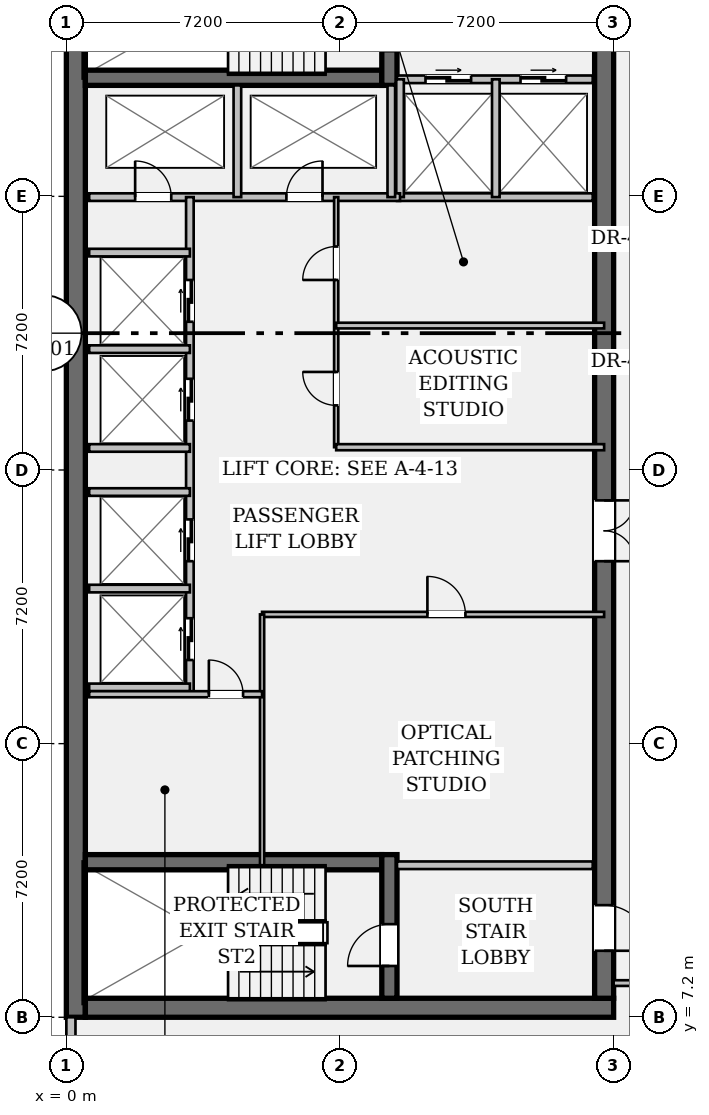
"""IFC4 building model, lengths in metres.
Left out: names, types, materials, properties, quantities, classifications, styles, units other than length and angle.
Written with IfcOpenShell. Run it as: python <this file> out.ifc"""

import sys

from ifc_helpers import new_model, si_unit, direction, frame, frame_2d, origin, place, context, subcontext, project, spatial, rectangle, extrude, element, fill, save


model = new_model("IFC4")
c1 = context("Model", 3, precision=1e-05, world=origin(), true_north=direction((0.0, 1.0)))
c2 = subcontext(c1, "Body", "Model", "MODEL_VIEW")
j1 = project(units=[si_unit("LENGTHUNIT", "METRE"), si_unit("PLANEANGLEUNIT", "RADIAN")], contexts=[c1])
p1 = place(None, origin())
s1 = spatial("IfcSite", under=j1, at=p1, CompositionType="ELEMENT")
p2 = place(p1, origin())
s2 = spatial("IfcBuilding", under=s1, at=p2, CompositionType="ELEMENT")
p3 = place(p2, frame((0.0, 0.0, 241.15)))
s3 = spatial("IfcBuildingStorey", under=s2, at=p3, CompositionType="ELEMENT", Elevation=241.15)
p4 = place(p3, frame((0.25, 7.2, 0.0), z_axis=(0.0, 0.0, 1.0), x_axis=(0.0, 1.0, 0.0)))
e1 = element("IfcWall", 1, at=p4, inside=s3, PredefinedType="SHEAR", context=c2, shape_type="SweptSolid", body=[
    extrude(rectangle(XDim=28.8, YDim=0.5, at=frame_2d((14.4, 0.0))), origin(), (0.0, 0.0, 1.0), 3.24),
])
p5 = place(p3, frame((0.5, 7.45, 0.0), z_axis=(0.0, 0.0, 1.0), x_axis=(1.0, 0.0, 0.0)))
e2 = element("IfcWall", 2, at=p5, inside=s3, PredefinedType="SHEAR", context=c2, shape_type="SweptSolid", body=[
    extrude(rectangle(XDim=13.9, YDim=0.5, at=frame_2d((6.95, 0.0))), origin(), (0.0, 0.0, 1.0), 3.24),
])
p6 = place(p3, frame((14.15, 35.5, 0.0), z_axis=(0.0, 0.0, 1.0), x_axis=(0.0, -1.0, 0.0)))
e3 = element("IfcWall", 3, at=p6, inside=s3, PredefinedType="SHEAR", context=c2, shape_type="SweptSolid", body=[
    extrude(rectangle(XDim=27.8, YDim=0.5, at=frame_2d((13.9, 0.0))), origin(), (0.0, 0.0, 1.0), 3.24),
])
p7 = place(p6, frame((1.4, 0.0, 0.0)))
e4 = element("IfcOpeningElement", 4, at=p7, cuts=e3, PredefinedType="OPENING", context=c2, shape_type="SweptSolid", body=[
    extrude(rectangle(XDim=1.2, YDim=2.15, at=frame_2d((0.6, 1.075))), frame((0.0, 0.262, 0.0), z_axis=(0.0, -1.0, 0.0), x_axis=(1.0, 0.0, 0.0)), (0.0, 0.0, 1.0), 0.524),
])
p8 = place(p6, frame((25.35, 0.0, 0.0)))
e5 = element("IfcOpeningElement", 5, at=p8, cuts=e3, PredefinedType="OPENING", context=c2, shape_type="SweptSolid", body=[
    extrude(rectangle(XDim=1.2, YDim=2.15, at=frame_2d((0.6, 1.075))), frame((0.0, 0.262, 0.0), z_axis=(0.0, -1.0, 0.0), x_axis=(1.0, 0.0, 0.0)), (0.0, 0.0, 1.0), 0.524),
])
p9 = place(p6, frame((14.7, 0.0, 0.0)))
e6 = element("IfcOpeningElement", 6, at=p9, cuts=e3, PredefinedType="OPENING", context=c2, shape_type="SweptSolid", body=[
    extrude(rectangle(XDim=1.6, YDim=2.2, at=frame_2d((0.8, 1.1))), frame((0.0, 0.262, 0.0), z_axis=(0.0, -1.0, 0.0), x_axis=(1.0, 0.0, 0.0)), (0.0, 0.0, 1.0), 0.524),
])
for number, where, z_axis, x_axis in (
    (7, (0.5, 31.92, 0.0), (0.0, 0.0, 1.0), (1.0, 0.0, 0.0)),
    (8, (0.5, 11.28, 0.0), (0.0, 0.0, 1.0), (1.0, 0.0, 0.0)),
):
    element("IfcWall", number, at=place(p3, frame(where, z_axis=z_axis, x_axis=x_axis)), inside=s3, PredefinedType="SHEAR", context=c2, shape_type="SweptSolid", body=[
        extrude(rectangle(XDim=7.8, YDim=0.4, at=frame_2d((3.9, 0.0))), origin(), (0.0, 0.0, 1.0), 3.24),
    ])
p10 = place(p3, frame((8.5, 31.72, 0.0), z_axis=(0.0, 0.0, 1.0), x_axis=(0.0, 1.0, 0.0)))
e9 = element("IfcWall", 9, at=p10, inside=s3, PredefinedType="SHEAR", context=c2, shape_type="SweptSolid", body=[
    extrude(rectangle(XDim=3.78, YDim=0.4, at=frame_2d((1.89, 0.0))), origin(), (0.0, 0.0, 1.0), 3.24),
])
p11 = place(p10, frame((0.9, 0.0, 0.0)))
e10 = element("IfcOpeningElement", 10, at=p11, cuts=e9, PredefinedType="OPENING", context=c2, shape_type="SweptSolid", body=[
    extrude(rectangle(XDim=1.1, YDim=2.15, at=frame_2d((0.55, 1.075))), frame((0.0, 0.212, 0.0), z_axis=(0.0, -1.0, 0.0), x_axis=(1.0, 0.0, 0.0)), (0.0, 0.0, 1.0), 0.424),
])
p12 = place(p3, frame((8.5, 7.7, 0.0), z_axis=(0.0, 0.0, 1.0), x_axis=(0.0, 1.0, 0.0)))
e11 = element("IfcWall", 11, at=p12, inside=s3, PredefinedType="SHEAR", context=c2, shape_type="SweptSolid", body=[
    extrude(rectangle(XDim=3.78, YDim=0.4, at=frame_2d((1.89, 0.0))), origin(), (0.0, 0.0, 1.0), 3.24),
])
p13 = place(p12, frame((0.85, 0.0, 0.0)))
e12 = element("IfcOpeningElement", 12, at=p13, cuts=e11, PredefinedType="OPENING", context=c2, shape_type="SweptSolid", body=[
    extrude(rectangle(XDim=1.1, YDim=2.15, at=frame_2d((0.55, 1.075))), frame((0.0, 0.212, 0.0), z_axis=(0.0, -1.0, 0.0), x_axis=(1.0, 0.0, 0.0)), (0.0, 0.0, 1.0), 0.424),
])
p14 = place(p3, frame((0.12, 6.52, 0.0), z_axis=(0.0, 0.0, 1.0), x_axis=(0.0, 1.0, 0.0)))
e13 = element("IfcWall", 13, at=p14, inside=s3, PredefinedType="STANDARD", context=c2, shape_type="SweptSolid", body=[
    extrude(rectangle(XDim=0.68, YDim=0.24, at=frame_2d((0.34, 0.0))), origin(), (0.0, 0.0, 1.0), 3.24),
])
p15 = place(p3, frame((8.7, 31.88, 0.0), z_axis=(0.0, 0.0, 1.0), x_axis=(1.0, 0.0, 0.0)))
e14 = element("IfcWall", 14, at=p15, inside=s3, PredefinedType="PARTITIONING", context=c2, shape_type="SweptSolid", body=[
    extrude(rectangle(XDim=5.15, YDim=0.2, at=frame_2d((2.575, 0.0))), origin(), (0.0, 0.0, 1.0), 3.24),
])
p16 = place(p15, frame((0.75, 0.0, 0.0)))
e15 = element("IfcOpeningElement", 15, at=p16, cuts=e14, PredefinedType="OPENING", context=c2, shape_type="SweptSolid", body=[
    extrude(rectangle(XDim=1.2, YDim=2.2, at=frame_2d((0.6, 1.1))), frame((0.0, 0.112, 0.0), z_axis=(0.0, -1.0, 0.0), x_axis=(1.0, 0.0, 0.0)), (0.0, 0.0, 1.0), 0.224),
])
p17 = place(p15, frame((3.25, 0.0, 0.0)))
e16 = element("IfcOpeningElement", 16, at=p17, cuts=e14, PredefinedType="OPENING", context=c2, shape_type="SweptSolid", body=[
    extrude(rectangle(XDim=1.2, YDim=2.2, at=frame_2d((0.6, 1.1))), frame((0.0, 0.112, 0.0), z_axis=(0.0, -1.0, 0.0), x_axis=(1.0, 0.0, 0.0)), (0.0, 0.0, 1.0), 0.224),
])
for number, where, z_axis, x_axis in (
    (17, (8.7, 11.2, 0.0), (0.0, 0.0, 1.0), (1.0, 0.0, 0.0)),
    (18, (8.7, 28.78, 0.0), (0.0, 0.0, 1.0), (1.0, 0.0, 0.0)),
):
    element("IfcWall", number, at=place(p3, frame(where, z_axis=z_axis, x_axis=x_axis)), inside=s3, PredefinedType="PARTITIONING", context=c2, shape_type="SweptSolid", body=[
        extrude(rectangle(XDim=5.15, YDim=0.2, at=frame_2d((2.575, 0.0))), origin(), (0.0, 0.0, 1.0), 3.24),
    ])
for number, where, z_axis, x_axis in (
    (19, (8.78, 28.78, 0.0), (0.0, 0.0, 1.0), (0.0, 1.0, 0.0)),
    (20, (11.3, 28.78, 0.0), (0.0, 0.0, 1.0), (0.0, 1.0, 0.0)),
):
    element("IfcWall", number, at=place(p3, frame(where, z_axis=z_axis, x_axis=x_axis)), inside=s3, PredefinedType="PARTITIONING", context=c2, shape_type="SweptSolid", body=[
        extrude(rectangle(XDim=3.1, YDim=0.2, at=frame_2d((1.55, 0.0))), origin(), (0.0, 0.0, 1.0), 3.24),
    ])
p18 = place(p3, frame((0.6, 28.78, 0.0), z_axis=(0.0, 0.0, 1.0), x_axis=(1.0, 0.0, 0.0)))
e21 = element("IfcWall", 21, at=p18, inside=s3, PredefinedType="PARTITIONING", context=c2, shape_type="SweptSolid", body=[
    extrude(rectangle(XDim=8.18, YDim=0.2, at=frame_2d((4.09, 0.0))), origin(), (0.0, 0.0, 1.0), 3.24),
])
p19 = place(p18, frame((1.21, 0.0, 0.0)))
e22 = element("IfcOpeningElement", 22, at=p19, cuts=e21, PredefinedType="OPENING", context=c2, shape_type="SweptSolid", body=[
    extrude(rectangle(XDim=0.95, YDim=2.15, at=frame_2d((0.475, 1.075))), frame((0.0, 0.112, 0.0), z_axis=(0.0, -1.0, 0.0), x_axis=(1.0, 0.0, 0.0)), (0.0, 0.0, 1.0), 0.224),
])
p20 = place(p18, frame((5.19, 0.0, 0.0)))
e23 = element("IfcOpeningElement", 23, at=p20, cuts=e21, PredefinedType="OPENING", context=c2, shape_type="SweptSolid", body=[
    extrude(rectangle(XDim=0.95, YDim=2.15, at=frame_2d((0.475, 1.075))), frame((0.0, 0.112, 0.0), z_axis=(0.0, -1.0, 0.0), x_axis=(1.0, 0.0, 0.0)), (0.0, 0.0, 1.0), 0.224),
])
for number, where, z_axis, x_axis in (
    (24, (4.5, 28.78, 0.0), (0.0, 0.0, 1.0), (0.0, 1.0, 0.0)),
    (25, (8.55, 28.78, 0.0), (0.0, 0.0, 1.0), (0.0, 1.0, 0.0)),
):
    element("IfcWall", number, at=place(p3, frame(where, z_axis=z_axis, x_axis=x_axis)), inside=s3, PredefinedType="PARTITIONING", context=c2, shape_type="SweptSolid", body=[
        extrude(rectangle(XDim=2.94, YDim=0.2, at=frame_2d((1.47, 0.0))), origin(), (0.0, 0.0, 1.0), 3.24),
    ])
p21 = place(p3, frame((3.25, 15.7, 0.0), z_axis=(0.0, 0.0, 1.0), x_axis=(0.0, 1.0, 0.0)))
e26 = element("IfcWall", 26, at=p21, inside=s3, PredefinedType="PARTITIONING", context=c2, shape_type="SweptSolid", body=[
    extrude(rectangle(XDim=13.08, YDim=0.2, at=frame_2d((6.54, 0.0))), origin(), (0.0, 0.0, 1.0), 3.24),
])
p22 = place(p21, frame((0.9, 0.0, 0.0)))
e27 = element("IfcOpeningElement", 27, at=p22, cuts=e26, PredefinedType="OPENING", context=c2, shape_type="SweptSolid", body=[
    extrude(rectangle(XDim=1.1, YDim=2.2, at=frame_2d((0.55, 1.1))), frame((0.0, 0.112, 0.0), z_axis=(0.0, -1.0, 0.0), x_axis=(1.0, 0.0, 0.0)), (0.0, 0.0, 1.0), 0.224),
])
p23 = place(p21, frame((3.5, 0.0, 0.0)))
e28 = element("IfcOpeningElement", 28, at=p23, cuts=e26, PredefinedType="OPENING", context=c2, shape_type="SweptSolid", body=[
    extrude(rectangle(XDim=1.1, YDim=2.2, at=frame_2d((0.55, 1.1))), frame((0.0, 0.112, 0.0), z_axis=(0.0, -1.0, 0.0), x_axis=(1.0, 0.0, 0.0)), (0.0, 0.0, 1.0), 0.224),
])
p24 = place(p21, frame((7.2, 0.0, 0.0)))
e29 = element("IfcOpeningElement", 29, at=p24, cuts=e26, PredefinedType="OPENING", context=c2, shape_type="SweptSolid", body=[
    extrude(rectangle(XDim=1.1, YDim=2.2, at=frame_2d((0.55, 1.1))), frame((0.0, 0.112, 0.0), z_axis=(0.0, -1.0, 0.0), x_axis=(1.0, 0.0, 0.0)), (0.0, 0.0, 1.0), 0.224),
])
p25 = place(p21, frame((9.8, 0.0, 0.0)))
e30 = element("IfcOpeningElement", 30, at=p25, cuts=e26, PredefinedType="OPENING", context=c2, shape_type="SweptSolid", body=[
    extrude(rectangle(XDim=1.1, YDim=2.2, at=frame_2d((0.55, 1.1))), frame((0.0, 0.112, 0.0), z_axis=(0.0, -1.0, 0.0), x_axis=(1.0, 0.0, 0.0)), (0.0, 0.0, 1.0), 0.224),
])
for number, where, z_axis, x_axis in (
    (31, (0.6, 15.88, 0.0), (0.0, 0.0, 1.0), (1.0, 0.0, 0.0)),
    (32, (0.6, 18.48, 0.0), (0.0, 0.0, 1.0), (1.0, 0.0, 0.0)),
    (33, (0.6, 22.18, 0.0), (0.0, 0.0, 1.0), (1.0, 0.0, 0.0)),
    (34, (0.6, 24.78, 0.0), (0.0, 0.0, 1.0), (1.0, 0.0, 0.0)),
    (35, (0.6, 21.02, 0.0), (0.0, 0.0, 1.0), (1.0, 0.0, 0.0)),
    (36, (0.6, 27.32, 0.0), (0.0, 0.0, 1.0), (1.0, 0.0, 0.0)),
):
    element("IfcWall", number, at=place(p3, frame(where, z_axis=z_axis, x_axis=x_axis)), inside=s3, PredefinedType="PARTITIONING", context=c2, shape_type="SweptSolid", body=[
        extrude(rectangle(XDim=2.65, YDim=0.2, at=frame_2d((1.325, 0.0))), origin(), (0.0, 0.0, 1.0), 3.24),
    ])
p26 = place(p3, frame((7.1, 22.2, 0.0), z_axis=(0.0, 0.0, 1.0), x_axis=(0.0, 1.0, 0.0)))
e37 = element("IfcWall", 37, at=p26, inside=s3, PredefinedType="PARTITIONING", context=c2, shape_type="SweptSolid", body=[
    extrude(rectangle(XDim=6.58, YDim=0.11, at=frame_2d((3.29, 0.0))), origin(), (0.0, 0.0, 1.0), 3.24),
])
p27 = place(p26, frame((1.1, 0.0, 0.0)))
e38 = element("IfcOpeningElement", 38, at=p27, cuts=e37, PredefinedType="OPENING", context=c2, shape_type="SweptSolid", body=[
    extrude(rectangle(XDim=0.88, YDim=2.15, at=frame_2d((0.44, 1.075))), frame((0.0, 0.067, 0.0), z_axis=(0.0, -1.0, 0.0), x_axis=(1.0, 0.0, 0.0)), (0.0, 0.0, 1.0), 0.134),
])
p28 = place(p26, frame((4.4, 0.0, 0.0)))
e39 = element("IfcOpeningElement", 39, at=p28, cuts=e37, PredefinedType="OPENING", context=c2, shape_type="SweptSolid", body=[
    extrude(rectangle(XDim=0.88, YDim=2.15, at=frame_2d((0.44, 1.075))), frame((0.0, 0.067, 0.0), z_axis=(0.0, -1.0, 0.0), x_axis=(1.0, 0.0, 0.0)), (0.0, 0.0, 1.0), 0.134),
])
p29 = place(p3, frame((7.1, 22.2, 0.0), z_axis=(0.0, 0.0, 1.0), x_axis=(1.0, 0.0, 0.0)))
e40 = element("IfcWall", 40, at=p29, inside=s3, PredefinedType="PARTITIONING", context=c2, shape_type="SweptSolid", body=[
    extrude(rectangle(XDim=7.05, YDim=0.16, at=frame_2d((3.525, 0.0))), origin(), (0.0, 0.0, 1.0), 3.24),
])
p30 = place(p3, frame((7.1, 25.4, 0.0), z_axis=(0.0, 0.0, 1.0), x_axis=(1.0, 0.0, 0.0)))
e41 = element("IfcWall", 41, at=p30, inside=s3, PredefinedType="PARTITIONING", context=c2, shape_type="SweptSolid", body=[
    extrude(rectangle(XDim=7.05, YDim=0.15, at=frame_2d((3.525, 0.0))), origin(), (0.0, 0.0, 1.0), 3.24),
])
p31 = place(p3, frame((5.15, 17.8, 0.0), z_axis=(0.0, 0.0, 1.0), x_axis=(1.0, 0.0, 0.0)))
e42 = element("IfcWall", 42, at=p31, inside=s3, PredefinedType="PARTITIONING", context=c2, shape_type="SweptSolid", body=[
    extrude(rectangle(XDim=9.0, YDim=0.135, at=frame_2d((4.5, 0.0))), origin(), (0.0, 0.0, 1.0), 3.24),
])
p32 = place(p31, frame((4.35, 0.0, 0.0)))
e43 = element("IfcOpeningElement", 43, at=p32, cuts=e42, PredefinedType="OPENING", context=c2, shape_type="SweptSolid", body=[
    extrude(rectangle(XDim=1.0, YDim=2.15, at=frame_2d((0.5, 1.075))), frame((0.0, 0.08, 0.0), z_axis=(0.0, -1.0, 0.0), x_axis=(1.0, 0.0, 0.0)), (0.0, 0.0, 1.0), 0.159),
])
p33 = place(p3, frame((5.15, 11.2, 0.0), z_axis=(0.0, 0.0, 1.0), x_axis=(0.0, 1.0, 0.0)))
e44 = element("IfcWall", 44, at=p33, inside=s3, PredefinedType="PARTITIONING", context=c2, shape_type="SweptSolid", body=[
    extrude(rectangle(XDim=6.6, YDim=0.11, at=frame_2d((3.3, 0.0))), origin(), (0.0, 0.0, 1.0), 3.24),
])
p34 = place(p3, frame((0.6, 15.7, 0.0), z_axis=(0.0, 0.0, 1.0), x_axis=(1.0, 0.0, 0.0)))
e45 = element("IfcWall", 45, at=p34, inside=s3, PredefinedType="PARTITIONING", context=c2, shape_type="SweptSolid", body=[
    extrude(rectangle(XDim=4.55, YDim=0.16, at=frame_2d((2.275, 0.0))), origin(), (0.0, 0.0, 1.0), 3.24),
])
p35 = place(p34, frame((3.15, 0.0, 0.0)))
e46 = element("IfcOpeningElement", 46, at=p35, cuts=e45, PredefinedType="OPENING", context=c2, shape_type="SweptSolid", body=[
    extrude(rectangle(XDim=0.9, YDim=2.15, at=frame_2d((0.45, 1.075))), frame((0.0, 0.092, 0.0), z_axis=(0.0, -1.0, 0.0), x_axis=(1.0, 0.0, 0.0)), (0.0, 0.0, 1.0), 0.184),
])
p36 = place(p3, frame((14.4, 8.1, 0.0), z_axis=(0.0, 0.0, 1.0), x_axis=(1.0, 0.0, 0.0)))
e47 = element("IfcWall", 47, at=p36, inside=s3, PredefinedType="PARTITIONING", context=c2, shape_type="SweptSolid", body=[
    extrude(rectangle(XDim=2.95, YDim=0.15, at=frame_2d((1.475, 0.0))), origin(), (0.0, 0.0, 1.0), 3.24),
])
p37 = place(p36, frame((0.95, 0.0, 0.0)))
e48 = element("IfcOpeningElement", 48, at=p37, cuts=e47, PredefinedType="OPENING", context=c2, shape_type="SweptSolid", body=[
    extrude(rectangle(XDim=0.88, YDim=2.15, at=frame_2d((0.44, 1.075))), frame((0.0, 0.087, 0.0), z_axis=(0.0, -1.0, 0.0), x_axis=(1.0, 0.0, 0.0)), (0.0, 0.0, 1.0), 0.174),
])
p38 = place(p13, origin())
e49 = element("IfcDoor", 49, at=p38, inside=s3, OperationType="SINGLE_SWING_LEFT", PredefinedType="DOOR", context=c2, shape_type="SweptSolid", body=[
    extrude(rectangle(XDim=1.1, YDim=2.15, at=frame_2d((0.55, 1.075))), frame((0.0, 0.025, 0.0), z_axis=(0.0, -1.0, 0.0), x_axis=(1.0, 0.0, 0.0)), (0.0, 0.0, 1.0), 0.05),
])
fill(e12, e49)
p39 = place(p8, origin())
e50 = element("IfcDoor", 50, at=p39, inside=s3, OperationType="SINGLE_SWING_RIGHT", PredefinedType="DOOR", context=c2, shape_type="SweptSolid", body=[
    extrude(rectangle(XDim=1.2, YDim=2.15, at=frame_2d((0.6, 1.075))), frame((0.0, 0.025, 0.0), z_axis=(0.0, -1.0, 0.0), x_axis=(1.0, 0.0, 0.0)), (0.0, 0.0, 1.0), 0.05),
])
fill(e5, e50)
p40 = place(p16, origin())
e51 = element("IfcDoor", 51, at=p40, inside=s3, OperationType="DOUBLE_DOOR_SLIDING", PredefinedType="DOOR", context=c2, shape_type="SweptSolid", body=[
    extrude(rectangle(XDim=1.2, YDim=2.2, at=frame_2d((0.6, 1.1))), frame((0.0, 0.025, 0.0), z_axis=(0.0, -1.0, 0.0), x_axis=(1.0, 0.0, 0.0)), (0.0, 0.0, 1.0), 0.05),
])
fill(e15, e51)
p41 = place(p17, origin())
e52 = element("IfcDoor", 52, at=p41, inside=s3, OperationType="DOUBLE_DOOR_SLIDING", PredefinedType="DOOR", context=c2, shape_type="SweptSolid", body=[
    extrude(rectangle(XDim=1.2, YDim=2.2, at=frame_2d((0.6, 1.1))), frame((0.0, 0.025, 0.0), z_axis=(0.0, -1.0, 0.0), x_axis=(1.0, 0.0, 0.0)), (0.0, 0.0, 1.0), 0.05),
])
fill(e16, e52)
p42 = place(p19, origin())
e53 = element("IfcDoor", 53, at=p42, inside=s3, OperationType="SINGLE_SWING_LEFT", PredefinedType="DOOR", context=c2, shape_type="SweptSolid", body=[
    extrude(rectangle(XDim=0.95, YDim=2.15, at=frame_2d((0.475, 1.075))), frame((0.0, 0.025, 0.0), z_axis=(0.0, -1.0, 0.0), x_axis=(1.0, 0.0, 0.0)), (0.0, 0.0, 1.0), 0.05),
])
fill(e22, e53)
p43 = place(p20, origin())
e54 = element("IfcDoor", 54, at=p43, inside=s3, OperationType="SINGLE_SWING_RIGHT", PredefinedType="DOOR", context=c2, shape_type="SweptSolid", body=[
    extrude(rectangle(XDim=0.95, YDim=2.15, at=frame_2d((0.475, 1.075))), frame((0.0, 0.025, 0.0), z_axis=(0.0, -1.0, 0.0), x_axis=(1.0, 0.0, 0.0)), (0.0, 0.0, 1.0), 0.05),
])
fill(e23, e54)
p44 = place(p9, origin())
e55 = element("IfcDoor", 55, at=p44, inside=s3, OperationType="DOUBLE_DOOR_SINGLE_SWING", PredefinedType="DOOR", context=c2, shape_type="SweptSolid", body=[
    extrude(rectangle(XDim=1.6, YDim=2.2, at=frame_2d((0.8, 1.1))), frame((0.0, 0.025, 0.0), z_axis=(0.0, -1.0, 0.0), x_axis=(1.0, 0.0, 0.0)), (0.0, 0.0, 1.0), 0.05),
])
fill(e6, e55)
p45 = place(p22, origin())
e56 = element("IfcDoor", 56, at=p45, inside=s3, OperationType="DOUBLE_DOOR_SLIDING", PredefinedType="DOOR", context=c2, shape_type="SweptSolid", body=[
    extrude(rectangle(XDim=1.1, YDim=2.2, at=frame_2d((0.55, 1.1))), frame((0.0, 0.025, 0.0), z_axis=(0.0, -1.0, 0.0), x_axis=(1.0, 0.0, 0.0)), (0.0, 0.0, 1.0), 0.05),
])
fill(e27, e56)
p46 = place(p23, origin())
e57 = element("IfcDoor", 57, at=p46, inside=s3, OperationType="DOUBLE_DOOR_SLIDING", PredefinedType="DOOR", context=c2, shape_type="SweptSolid", body=[
    extrude(rectangle(XDim=1.1, YDim=2.2, at=frame_2d((0.55, 1.1))), frame((0.0, 0.025, 0.0), z_axis=(0.0, -1.0, 0.0), x_axis=(1.0, 0.0, 0.0)), (0.0, 0.0, 1.0), 0.05),
])
fill(e28, e57)
p47 = place(p24, origin())
e58 = element("IfcDoor", 58, at=p47, inside=s3, OperationType="DOUBLE_DOOR_SLIDING", PredefinedType="DOOR", context=c2, shape_type="SweptSolid", body=[
    extrude(rectangle(XDim=1.1, YDim=2.2, at=frame_2d((0.55, 1.1))), frame((0.0, 0.025, 0.0), z_axis=(0.0, -1.0, 0.0), x_axis=(1.0, 0.0, 0.0)), (0.0, 0.0, 1.0), 0.05),
])
fill(e29, e58)
p48 = place(p25, origin())
e59 = element("IfcDoor", 59, at=p48, inside=s3, OperationType="DOUBLE_DOOR_SLIDING", PredefinedType="DOOR", context=c2, shape_type="SweptSolid", body=[
    extrude(rectangle(XDim=1.1, YDim=2.2, at=frame_2d((0.55, 1.1))), frame((0.0, 0.025, 0.0), z_axis=(0.0, -1.0, 0.0), x_axis=(1.0, 0.0, 0.0)), (0.0, 0.0, 1.0), 0.05),
])
fill(e30, e59)
p49 = place(p27, origin())
e60 = element("IfcDoor", 60, at=p49, inside=s3, OperationType="SINGLE_SWING_RIGHT", PredefinedType="DOOR", context=c2, shape_type="SweptSolid", body=[
    extrude(rectangle(XDim=0.88, YDim=2.15, at=frame_2d((0.44, 1.075))), frame((0.0, 0.025, 0.0), z_axis=(0.0, -1.0, 0.0), x_axis=(1.0, 0.0, 0.0)), (0.0, 0.0, 1.0), 0.05),
])
fill(e38, e60)
p50 = place(p28, origin())
e61 = element("IfcDoor", 61, at=p50, inside=s3, OperationType="SINGLE_SWING_LEFT", PredefinedType="DOOR", context=c2, shape_type="SweptSolid", body=[
    extrude(rectangle(XDim=0.88, YDim=2.15, at=frame_2d((0.44, 1.075))), frame((0.0, 0.025, 0.0), z_axis=(0.0, -1.0, 0.0), x_axis=(1.0, 0.0, 0.0)), (0.0, 0.0, 1.0), 0.05),
])
fill(e39, e61)
p51 = place(p32, origin())
e62 = element("IfcDoor", 62, at=p51, inside=s3, OperationType="SINGLE_SWING_LEFT", PredefinedType="DOOR", context=c2, shape_type="SweptSolid", body=[
    extrude(rectangle(XDim=1.0, YDim=2.15, at=frame_2d((0.5, 1.075))), frame((0.0, 0.025, 0.0), z_axis=(0.0, -1.0, 0.0), x_axis=(1.0, 0.0, 0.0)), (0.0, 0.0, 1.0), 0.05),
])
fill(e43, e62)
p52 = place(p35, origin())
e63 = element("IfcDoor", 63, at=p52, inside=s3, OperationType="SINGLE_SWING_LEFT", PredefinedType="DOOR", context=c2, shape_type="SweptSolid", body=[
    extrude(rectangle(XDim=0.9, YDim=2.15, at=frame_2d((0.45, 1.075))), frame((0.0, 0.025, 0.0), z_axis=(0.0, -1.0, 0.0), x_axis=(1.0, 0.0, 0.0)), (0.0, 0.0, 1.0), 0.05),
])
fill(e46, e63)
save(model, sys.argv[1])
